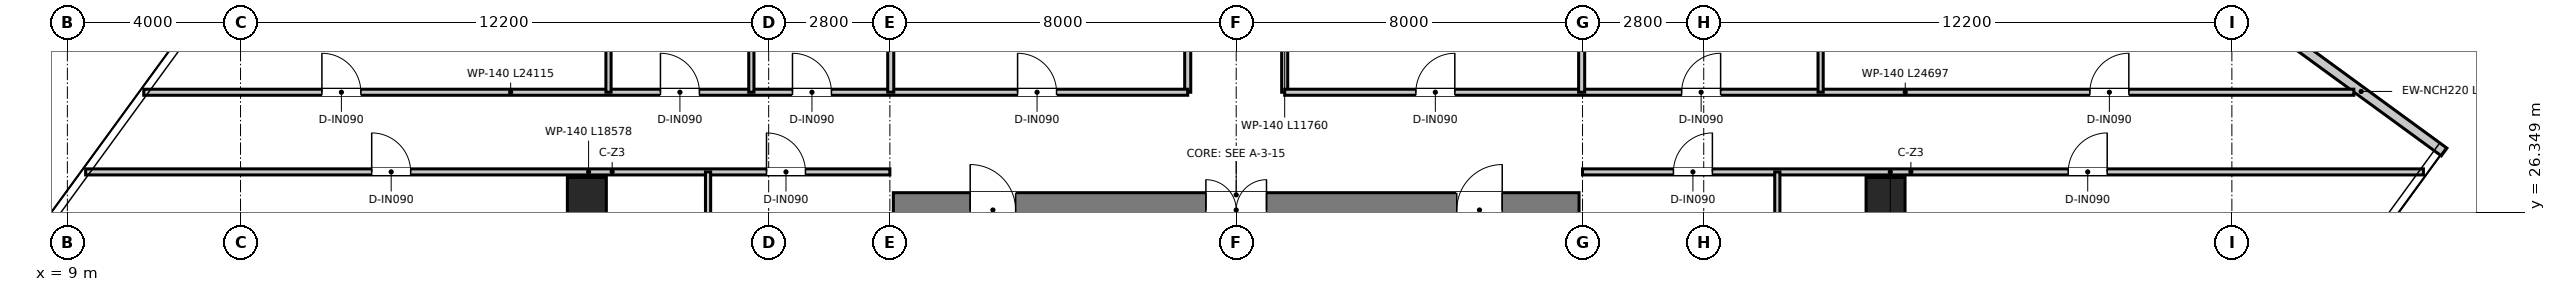
"""IFC4 building model, lengths in metres.
Left out: names, types, materials, properties, quantities, classifications, styles, units other than length and angle.
Written with IfcOpenShell. Run it as: python <this file> out.ifc"""

import sys

from ifc_helpers import new_model, si_unit, direction, frame, frame_2d, origin, origin_2d, place, context, subcontext, project, spatial, rectangle, extrude, source, transform, mapped, element, fill, save


model = new_model("IFC4")
c1 = context("Model", 3, precision=1e-05, world=origin(), true_north=direction((0.0, 1.0)))
c2 = subcontext(c1, "Body", "Model", "MODEL_VIEW")
j1 = project(units=[si_unit("LENGTHUNIT", "METRE"), si_unit("PLANEANGLEUNIT", "RADIAN")], contexts=[c1])
p1 = place(None, origin())
s1 = spatial("IfcSite", under=j1, at=p1, CompositionType="ELEMENT")
p2 = place(p1, origin())
s2 = spatial("IfcBuilding", under=s1, at=p2, CompositionType="ELEMENT")
p3 = place(p2, frame((0.0, 0.0, 193.6)))
s3 = spatial("IfcBuildingStorey", under=s2, at=p3, CompositionType="ELEMENT", Elevation=193.6)
p4 = place(p3, frame((28.08, 26.4, 0.0), z_axis=(0.0, 0.0, 1.0), x_axis=(1.0, 0.0, 0.0)))
e1 = element("IfcWall", 1, at=p4, inside=s3, PredefinedType="SHEAR", context=c2, shape_type="SweptSolid", body=[
    extrude(rectangle(XDim=15.84, YDim=0.8, at=frame_2d((7.92, 0.0))), origin(), (0.0, 0.0, 1.0), 3.95),
])
p5 = place(p4, frame((7.22, 0.0, 0.0)))
e2 = element("IfcOpeningElement", 2, at=p5, cuts=e1, PredefinedType="OPENING", context=c2, shape_type="SweptSolid", body=[
    extrude(rectangle(XDim=1.4, YDim=2.2, at=frame_2d((0.7, 1.1))), frame((0.0, 0.41, 0.0), z_axis=(0.0, -1.0, 0.0), x_axis=(1.0, 0.0, 0.0)), (0.0, 0.0, 1.0), 0.82),
])
p6 = place(p4, frame((1.775, 0.0, 0.0)))
e3 = element("IfcOpeningElement", 3, at=p6, cuts=e1, PredefinedType="OPENING", context=c2, shape_type="SweptSolid", body=[
    extrude(rectangle(XDim=1.05, YDim=2.1, at=frame_2d((0.525, 1.05))), frame((0.0, 0.41, 0.0), z_axis=(0.0, -1.0, 0.0), x_axis=(1.0, 0.0, 0.0)), (0.0, 0.0, 1.0), 0.82),
])
p7 = place(p4, frame((13.015, 0.0, 0.0)))
e4 = element("IfcOpeningElement", 4, at=p7, cuts=e1, PredefinedType="OPENING", context=c2, shape_type="SweptSolid", body=[
    extrude(rectangle(XDim=1.05, YDim=2.1, at=frame_2d((0.525, 1.05))), frame((0.0, 0.41, 0.0), z_axis=(0.0, -1.0, 0.0), x_axis=(1.0, 0.0, 0.0)), (0.0, 0.0, 1.0), 0.82),
])
m1 = source(origin(), c2, "Body", "SweptSolid", [
    extrude(rectangle(XDim=0.9, YDim=0.9, at=origin_2d()), origin(), (0.0, 0.0, 1.0), 3.95),
])
for number, where, z_axis, x_axis in (
    (5, (21.0, 26.7, 0.0), (0.0, 0.0, 1.0), (1.0, 0.0, 0.0)),
    (6, (51.0, 26.7, 0.0), (0.0, 0.0, 1.0), (1.0, 0.0, 0.0)),
):
    element("IfcColumn", number, at=place(p3, frame(where, z_axis=z_axis, x_axis=x_axis)), inside=s3, PredefinedType="COLUMN", context=c2, shape_type="MappedRepresentation", body=[
        mapped(m1, transform((0.0, 0.0, 0.0), x_axis=(1.0, 0.0, 0.0), y_axis=(0.0, 1.0, 0.0), z_axis=(0.0, 0.0, 1.0), scale=1.0)),
    ])
p8 = place(p3, frame((63.903, 27.74, 0.0), z_axis=(0.0, 0.0, 1.0), x_axis=(-0.807718106916, 0.58956887618, 0.0)))
e7 = element("IfcWall", 7, at=p8, inside=s3, PredefinedType="ELEMENTEDWALL", context=c2, shape_type="SweptSolid", body=[
    extrude(rectangle(XDim=4.745, YDim=0.22, at=frame_2d((2.373, 0.0))), origin(), (0.0, 0.0, 1.0), 3.67),
])
p9 = place(p3, frame((34.88, 29.12, 0.0), z_axis=(0.0, 0.0, 1.0), x_axis=(0.0, 1.0, 0.0)))
e8 = element("IfcWall", 8, at=p9, inside=s3, PredefinedType="PARTITIONING", context=c2, shape_type="SweptSolid", body=[
    extrude(rectangle(XDim=11.76, YDim=0.14, at=frame_2d((5.88, 0.0))), origin(), (0.0, 0.0, 1.0), 3.03),
])
p10 = place(p9, frame((3.205, 0.0, 0.0)))
e9 = element("IfcOpeningElement", 9, at=p10, cuts=e8, PredefinedType="OPENING", context=c2, shape_type="SweptSolid", body=[
    extrude(rectangle(XDim=0.95, YDim=2.1, at=frame_2d((0.475, 1.05))), frame((0.0, 0.08, 0.0), z_axis=(0.0, -1.0, 0.0), x_axis=(1.0, 0.0, 0.0)), (0.0, 0.0, 1.0), 0.16),
])
p11 = place(p9, frame((8.02, 0.0, 0.0)))
e10 = element("IfcOpeningElement", 10, at=p11, cuts=e8, PredefinedType="OPENING", context=c2, shape_type="SweptSolid", body=[
    extrude(rectangle(XDim=0.9, YDim=2.1, at=frame_2d((0.45, 1.05))), frame((0.0, 0.08, 0.0), z_axis=(0.0, -1.0, 0.0), x_axis=(1.0, 0.0, 0.0)), (0.0, 0.0, 1.0), 0.16),
])
p12 = place(p3, frame((37.12, 29.12, 0.0), z_axis=(0.0, 0.0, 1.0), x_axis=(0.0, 1.0, 0.0)))
e11 = element("IfcWall", 11, at=p12, inside=s3, PredefinedType="PARTITIONING", context=c2, shape_type="SweptSolid", body=[
    extrude(rectangle(XDim=11.76, YDim=0.14, at=frame_2d((5.88, 0.0))), origin(), (0.0, 0.0, 1.0), 3.03),
])
p13 = place(p12, frame((4.085, 0.0, 0.0)))
e12 = element("IfcOpeningElement", 12, at=p13, cuts=e11, PredefinedType="OPENING", context=c2, shape_type="SweptSolid", body=[
    extrude(rectangle(XDim=0.95, YDim=2.1, at=frame_2d((0.475, 1.05))), frame((0.0, 0.08, 0.0), z_axis=(0.0, -1.0, 0.0), x_axis=(1.0, 0.0, 0.0)), (0.0, 0.0, 1.0), 0.16),
])
p14 = place(p12, frame((8.02, 0.0, 0.0)))
e13 = element("IfcOpeningElement", 13, at=p14, cuts=e11, PredefinedType="OPENING", context=c2, shape_type="SweptSolid", body=[
    extrude(rectangle(XDim=0.9, YDim=2.1, at=frame_2d((0.45, 1.05))), frame((0.0, 0.08, 0.0), z_axis=(0.0, -1.0, 0.0), x_axis=(1.0, 0.0, 0.0)), (0.0, 0.0, 1.0), 0.16),
])
p15 = place(p3, frame((10.765, 29.12, 0.0), z_axis=(0.0, 0.0, 1.0), x_axis=(1.0, 0.0, 0.0)))
e14 = element("IfcWall", 14, at=p15, inside=s3, PredefinedType="PARTITIONING", context=c2, shape_type="SweptSolid", body=[
    extrude(rectangle(XDim=24.115, YDim=0.14, at=frame_2d((12.058, 0.0))), origin(), (0.0, 0.0, 1.0), 3.03),
])
p16 = place(p15, frame((20.185, 0.0, 0.0)))
e15 = element("IfcOpeningElement", 15, at=p16, cuts=e14, PredefinedType="OPENING", context=c2, shape_type="SweptSolid", body=[
    extrude(rectangle(XDim=0.9, YDim=2.1, at=frame_2d((0.45, 1.05))), frame((0.0, 0.08, 0.0), z_axis=(0.0, -1.0, 0.0), x_axis=(1.0, 0.0, 0.0)), (0.0, 0.0, 1.0), 0.16),
])
p17 = place(p15, frame((4.115, 0.0, 0.0)))
e16 = element("IfcOpeningElement", 16, at=p17, cuts=e14, PredefinedType="OPENING", context=c2, shape_type="SweptSolid", body=[
    extrude(rectangle(XDim=0.9, YDim=2.1, at=frame_2d((0.45, 1.05))), frame((0.0, 0.08, 0.0), z_axis=(0.0, -1.0, 0.0), x_axis=(1.0, 0.0, 0.0)), (0.0, 0.0, 1.0), 0.16),
])
p18 = place(p15, frame((11.935, 0.0, 0.0)))
e17 = element("IfcOpeningElement", 17, at=p18, cuts=e14, PredefinedType="OPENING", context=c2, shape_type="SweptSolid", body=[
    extrude(rectangle(XDim=0.9, YDim=2.1, at=frame_2d((0.45, 1.05))), frame((0.0, 0.08, 0.0), z_axis=(0.0, -1.0, 0.0), x_axis=(1.0, 0.0, 0.0)), (0.0, 0.0, 1.0), 0.16),
])
p19 = place(p15, frame((14.985, 0.0, 0.0)))
e18 = element("IfcOpeningElement", 18, at=p19, cuts=e14, PredefinedType="OPENING", context=c2, shape_type="SweptSolid", body=[
    extrude(rectangle(XDim=0.9, YDim=2.1, at=frame_2d((0.45, 1.05))), frame((0.0, 0.08, 0.0), z_axis=(0.0, -1.0, 0.0), x_axis=(1.0, 0.0, 0.0)), (0.0, 0.0, 1.0), 0.16),
])
p20 = place(p3, frame((37.12, 29.12, 0.0), z_axis=(0.0, 0.0, 1.0), x_axis=(1.0, 0.0, 0.0)))
e19 = element("IfcWall", 19, at=p20, inside=s3, PredefinedType="PARTITIONING", context=c2, shape_type="SweptSolid", body=[
    extrude(rectangle(XDim=24.697, YDim=0.14, at=frame_2d((12.348, 0.0))), origin(), (0.0, 0.0, 1.0), 3.03),
])
p21 = place(p20, frame((3.03, 0.0, 0.0)))
e20 = element("IfcOpeningElement", 20, at=p21, cuts=e19, PredefinedType="OPENING", context=c2, shape_type="SweptSolid", body=[
    extrude(rectangle(XDim=0.9, YDim=2.1, at=frame_2d((0.45, 1.05))), frame((0.0, 0.08, 0.0), z_axis=(0.0, -1.0, 0.0), x_axis=(1.0, 0.0, 0.0)), (0.0, 0.0, 1.0), 0.16),
])
p22 = place(p20, frame((9.17, 0.0, 0.0)))
e21 = element("IfcOpeningElement", 21, at=p22, cuts=e19, PredefinedType="OPENING", context=c2, shape_type="SweptSolid", body=[
    extrude(rectangle(XDim=0.9, YDim=2.1, at=frame_2d((0.45, 1.05))), frame((0.0, 0.08, 0.0), z_axis=(0.0, -1.0, 0.0), x_axis=(1.0, 0.0, 0.0)), (0.0, 0.0, 1.0), 0.16),
])
p23 = place(p20, frame((18.6, 0.0, 0.0)))
e22 = element("IfcOpeningElement", 22, at=p23, cuts=e19, PredefinedType="OPENING", context=c2, shape_type="SweptSolid", body=[
    extrude(rectangle(XDim=0.9, YDim=2.1, at=frame_2d((0.45, 1.05))), frame((0.0, 0.08, 0.0), z_axis=(0.0, -1.0, 0.0), x_axis=(1.0, 0.0, 0.0)), (0.0, 0.0, 1.0), 0.16),
])
p24 = place(p3, frame((9.422, 27.28, 0.0), z_axis=(0.0, 0.0, 1.0), x_axis=(1.0, 0.0, 0.0)))
e23 = element("IfcWall", 23, at=p24, inside=s3, PredefinedType="PARTITIONING", context=c2, shape_type="SweptSolid", body=[
    extrude(rectangle(XDim=18.578, YDim=0.14, at=frame_2d((9.289, 0.0))), origin(), (0.0, 0.0, 1.0), 3.03),
])
p25 = place(p24, frame((6.608, 0.0, 0.0)))
e24 = element("IfcOpeningElement", 24, at=p25, cuts=e23, PredefinedType="OPENING", context=c2, shape_type="SweptSolid", body=[
    extrude(rectangle(XDim=0.9, YDim=2.1, at=frame_2d((0.45, 1.05))), frame((0.0, 0.08, 0.0), z_axis=(0.0, -1.0, 0.0), x_axis=(1.0, 0.0, 0.0)), (0.0, 0.0, 1.0), 0.16),
])
p26 = place(p24, frame((15.728, 0.0, 0.0)))
e25 = element("IfcOpeningElement", 25, at=p26, cuts=e23, PredefinedType="OPENING", context=c2, shape_type="SweptSolid", body=[
    extrude(rectangle(XDim=0.9, YDim=2.1, at=frame_2d((0.45, 1.05))), frame((0.0, 0.08, 0.0), z_axis=(0.0, -1.0, 0.0), x_axis=(1.0, 0.0, 0.0)), (0.0, 0.0, 1.0), 0.16),
])
p27 = place(p3, frame((44.0, 27.28, 0.0), z_axis=(0.0, 0.0, 1.0), x_axis=(1.0, 0.0, 0.0)))
e26 = element("IfcWall", 26, at=p27, inside=s3, PredefinedType="PARTITIONING", context=c2, shape_type="SweptSolid", body=[
    extrude(rectangle(XDim=19.425, YDim=0.14, at=frame_2d((9.712, 0.0))), origin(), (0.0, 0.0, 1.0), 3.03),
])
p28 = place(p27, frame((2.1, 0.0, 0.0)))
e27 = element("IfcOpeningElement", 27, at=p28, cuts=e26, PredefinedType="OPENING", context=c2, shape_type="SweptSolid", body=[
    extrude(rectangle(XDim=0.9, YDim=2.1, at=frame_2d((0.45, 1.05))), frame((0.0, 0.08, 0.0), z_axis=(0.0, -1.0, 0.0), x_axis=(1.0, 0.0, 0.0)), (0.0, 0.0, 1.0), 0.16),
])
p29 = place(p27, frame((11.22, 0.0, 0.0)))
e28 = element("IfcOpeningElement", 28, at=p29, cuts=e26, PredefinedType="OPENING", context=c2, shape_type="SweptSolid", body=[
    extrude(rectangle(XDim=0.9, YDim=2.1, at=frame_2d((0.45, 1.05))), frame((0.0, 0.08, 0.0), z_axis=(0.0, -1.0, 0.0), x_axis=(1.0, 0.0, 0.0)), (0.0, 0.0, 1.0), 0.16),
])
for number, where, z_axis, x_axis in (
    (29, (28.02, 29.12, 0.0), (0.0, 0.0, 1.0), (0.0, 1.0, 0.0)),
    (30, (43.98, 29.12, 0.0), (0.0, 0.0, 1.0), (0.0, 1.0, 0.0)),
):
    element("IfcWall", number, at=place(p3, frame(where, z_axis=z_axis, x_axis=x_axis)), inside=s3, PredefinedType="PARTITIONING", context=c2, shape_type="SweptSolid", body=[
        extrude(rectangle(XDim=5.46, YDim=0.14, at=frame_2d((2.73, 0.0))), origin(), (0.0, 0.0, 1.0), 3.31),
    ])
p30 = place(p3, frame((21.5, 29.12, 0.0), z_axis=(0.0, 0.0, 1.0), x_axis=(0.0, 1.0, 0.0)))
e31 = element("IfcWall", 31, at=p30, inside=s3, PredefinedType="PARTITIONING", context=c2, shape_type="SweptSolid", body=[
    extrude(rectangle(XDim=14.708, YDim=0.12, at=frame_2d((7.354, 0.0))), origin(), (0.0, 0.0, 1.0), 3.08),
])
p31 = place(p3, frame((24.8, 29.12, 0.0), z_axis=(0.0, 0.0, 1.0), x_axis=(0.0, 1.0, 0.0)))
e32 = element("IfcWall", 32, at=p31, inside=s3, PredefinedType="PARTITIONING", context=c2, shape_type="SweptSolid", body=[
    extrude(rectangle(XDim=19.229, YDim=0.12, at=frame_2d((9.615, 0.0))), origin(), (0.0, 0.0, 1.0), 3.08),
])
p32 = place(p3, frame((49.5, 29.12, 0.0), z_axis=(0.0, 0.0, 1.0), x_axis=(0.0, 1.0, 0.0)))
e33 = element("IfcWall", 33, at=p32, inside=s3, PredefinedType="PARTITIONING", context=c2, shape_type="SweptSolid", body=[
    extrude(rectangle(XDim=14.728, YDim=0.12, at=frame_2d((7.364, 0.0))), origin(), (0.0, 0.0, 1.0), 3.08),
])
p33 = place(p3, frame((23.8, 8.603, 0.0), z_axis=(0.0, 0.0, 1.0), x_axis=(0.0, 1.0, 0.0)))
e34 = element("IfcWall", 34, at=p33, inside=s3, PredefinedType="PARTITIONING", context=c2, shape_type="SweptSolid", body=[
    extrude(rectangle(XDim=18.677, YDim=0.12, at=frame_2d((9.338, 0.0))), origin(), (0.0, 0.0, 1.0), 3.08),
])
p34 = place(p3, frame((48.5, 6.832, 0.0), z_axis=(0.0, 0.0, 1.0), x_axis=(0.0, 1.0, 0.0)))
e35 = element("IfcWall", 35, at=p34, inside=s3, PredefinedType="PARTITIONING", context=c2, shape_type="SweptSolid", body=[
    extrude(rectangle(XDim=20.448, YDim=0.12, at=frame_2d((10.224, 0.0))), origin(), (0.0, 0.0, 1.0), 3.08),
])
p35 = place(p5, origin())
e36 = element("IfcDoor", 36, at=p35, inside=s3, OperationType="DOUBLE_DOOR_SINGLE_SWING", PredefinedType="DOOR", context=c2, shape_type="SweptSolid", body=[
    extrude(rectangle(XDim=1.4, YDim=2.2, at=frame_2d((0.7, 1.1))), frame((0.0, 0.025, 0.0), z_axis=(0.0, -1.0, 0.0), x_axis=(1.0, 0.0, 0.0)), (0.0, 0.0, 1.0), 0.05),
])
fill(e2, e36)
p36 = place(p6, origin())
e37 = element("IfcDoor", 37, at=p36, inside=s3, OperationType="SINGLE_SWING_LEFT", PredefinedType="DOOR", context=c2, shape_type="SweptSolid", body=[
    extrude(rectangle(XDim=1.05, YDim=2.1, at=frame_2d((0.525, 1.05))), frame((0.0, 0.025, 0.0), z_axis=(0.0, -1.0, 0.0), x_axis=(1.0, 0.0, 0.0)), (0.0, 0.0, 1.0), 0.05),
])
fill(e3, e37)
p37 = place(p7, origin())
e38 = element("IfcDoor", 38, at=p37, inside=s3, OperationType="SINGLE_SWING_RIGHT", PredefinedType="DOOR", context=c2, shape_type="SweptSolid", body=[
    extrude(rectangle(XDim=1.05, YDim=2.1, at=frame_2d((0.525, 1.05))), frame((0.0, 0.025, 0.0), z_axis=(0.0, -1.0, 0.0), x_axis=(1.0, 0.0, 0.0)), (0.0, 0.0, 1.0), 0.05),
])
fill(e4, e38)
p38 = place(p16, origin())
e39 = element("IfcDoor", 39, at=p38, inside=s3, OperationType="SINGLE_SWING_LEFT", PredefinedType="DOOR", context=c2, shape_type="SweptSolid", body=[
    extrude(rectangle(XDim=0.9, YDim=2.1, at=frame_2d((0.45, 1.05))), frame((0.0, 0.025, 0.0), z_axis=(0.0, -1.0, 0.0), x_axis=(1.0, 0.0, 0.0)), (0.0, 0.0, 1.0), 0.05),
])
fill(e15, e39)
p39 = place(p21, origin())
e40 = element("IfcDoor", 40, at=p39, inside=s3, OperationType="SINGLE_SWING_RIGHT", PredefinedType="DOOR", context=c2, shape_type="SweptSolid", body=[
    extrude(rectangle(XDim=0.9, YDim=2.1, at=frame_2d((0.45, 1.05))), frame((0.0, 0.025, 0.0), z_axis=(0.0, -1.0, 0.0), x_axis=(1.0, 0.0, 0.0)), (0.0, 0.0, 1.0), 0.05),
])
fill(e20, e40)
p40 = place(p17, origin())
e41 = element("IfcDoor", 41, at=p40, inside=s3, OperationType="SINGLE_SWING_LEFT", PredefinedType="DOOR", context=c2, shape_type="SweptSolid", body=[
    extrude(rectangle(XDim=0.9, YDim=2.1, at=frame_2d((0.45, 1.05))), frame((0.0, 0.025, 0.0), z_axis=(0.0, -1.0, 0.0), x_axis=(1.0, 0.0, 0.0)), (0.0, 0.0, 1.0), 0.05),
])
fill(e16, e41)
p41 = place(p18, origin())
e42 = element("IfcDoor", 42, at=p41, inside=s3, OperationType="SINGLE_SWING_LEFT", PredefinedType="DOOR", context=c2, shape_type="SweptSolid", body=[
    extrude(rectangle(XDim=0.9, YDim=2.1, at=frame_2d((0.45, 1.05))), frame((0.0, 0.025, 0.0), z_axis=(0.0, -1.0, 0.0), x_axis=(1.0, 0.0, 0.0)), (0.0, 0.0, 1.0), 0.05),
])
fill(e17, e42)
p42 = place(p19, origin())
e43 = element("IfcDoor", 43, at=p42, inside=s3, OperationType="SINGLE_SWING_LEFT", PredefinedType="DOOR", context=c2, shape_type="SweptSolid", body=[
    extrude(rectangle(XDim=0.9, YDim=2.1, at=frame_2d((0.45, 1.05))), frame((0.0, 0.025, 0.0), z_axis=(0.0, -1.0, 0.0), x_axis=(1.0, 0.0, 0.0)), (0.0, 0.0, 1.0), 0.05),
])
fill(e18, e43)
p43 = place(p22, origin())
e44 = element("IfcDoor", 44, at=p43, inside=s3, OperationType="SINGLE_SWING_RIGHT", PredefinedType="DOOR", context=c2, shape_type="SweptSolid", body=[
    extrude(rectangle(XDim=0.9, YDim=2.1, at=frame_2d((0.45, 1.05))), frame((0.0, 0.025, 0.0), z_axis=(0.0, -1.0, 0.0), x_axis=(1.0, 0.0, 0.0)), (0.0, 0.0, 1.0), 0.05),
])
fill(e21, e44)
p44 = place(p23, origin())
e45 = element("IfcDoor", 45, at=p44, inside=s3, OperationType="SINGLE_SWING_RIGHT", PredefinedType="DOOR", context=c2, shape_type="SweptSolid", body=[
    extrude(rectangle(XDim=0.9, YDim=2.1, at=frame_2d((0.45, 1.05))), frame((0.0, 0.025, 0.0), z_axis=(0.0, -1.0, 0.0), x_axis=(1.0, 0.0, 0.0)), (0.0, 0.0, 1.0), 0.05),
])
fill(e22, e45)
p45 = place(p25, origin())
e46 = element("IfcDoor", 46, at=p45, inside=s3, OperationType="SINGLE_SWING_LEFT", PredefinedType="DOOR", context=c2, shape_type="SweptSolid", body=[
    extrude(rectangle(XDim=0.9, YDim=2.1, at=frame_2d((0.45, 1.05))), frame((0.0, 0.025, 0.0), z_axis=(0.0, -1.0, 0.0), x_axis=(1.0, 0.0, 0.0)), (0.0, 0.0, 1.0), 0.05),
])
fill(e24, e46)
p46 = place(p26, origin())
e47 = element("IfcDoor", 47, at=p46, inside=s3, OperationType="SINGLE_SWING_LEFT", PredefinedType="DOOR", context=c2, shape_type="SweptSolid", body=[
    extrude(rectangle(XDim=0.9, YDim=2.1, at=frame_2d((0.45, 1.05))), frame((0.0, 0.025, 0.0), z_axis=(0.0, -1.0, 0.0), x_axis=(1.0, 0.0, 0.0)), (0.0, 0.0, 1.0), 0.05),
])
fill(e25, e47)
p47 = place(p28, origin())
e48 = element("IfcDoor", 48, at=p47, inside=s3, OperationType="SINGLE_SWING_RIGHT", PredefinedType="DOOR", context=c2, shape_type="SweptSolid", body=[
    extrude(rectangle(XDim=0.9, YDim=2.1, at=frame_2d((0.45, 1.05))), frame((0.0, 0.025, 0.0), z_axis=(0.0, -1.0, 0.0), x_axis=(1.0, 0.0, 0.0)), (0.0, 0.0, 1.0), 0.05),
])
fill(e27, e48)
p48 = place(p29, origin())
e49 = element("IfcDoor", 49, at=p48, inside=s3, OperationType="SINGLE_SWING_RIGHT", PredefinedType="DOOR", context=c2, shape_type="SweptSolid", body=[
    extrude(rectangle(XDim=0.9, YDim=2.1, at=frame_2d((0.45, 1.05))), frame((0.0, 0.025, 0.0), z_axis=(0.0, -1.0, 0.0), x_axis=(1.0, 0.0, 0.0)), (0.0, 0.0, 1.0), 0.05),
])
fill(e28, e49)
save(model, sys.argv[1])
